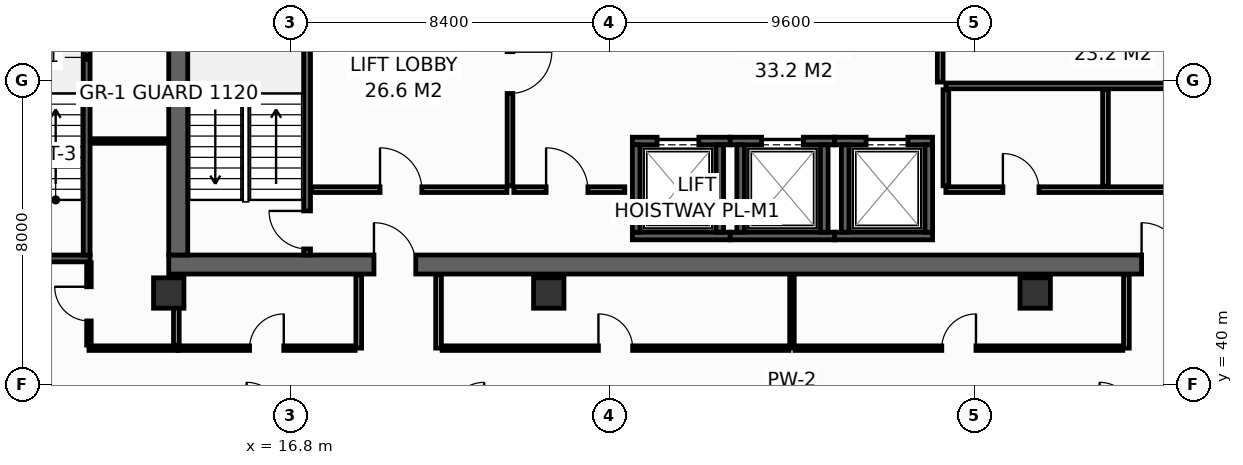
"""IFC4 building model, lengths in metres.
Left out: names, types, materials, properties, quantities, classifications, styles, units other than length and angle.
Written with IfcOpenShell. Run it as: python <this file> out.ifc"""

import sys

from ifc_helpers import new_model, si_unit, direction, frame, frame_2d, origin, origin_2d, place, context, subcontext, project, spatial, rectangle, hollow_rectangle, extrude, element, fill, save


model = new_model("IFC4")
c1 = context("Model", 3, precision=1e-05, world=origin(), true_north=direction((0.0, 1.0)))
c2 = subcontext(c1, "Body", "Model", "MODEL_VIEW")
j1 = project(units=[si_unit("LENGTHUNIT", "METRE"), si_unit("PLANEANGLEUNIT", "RADIAN")], contexts=[c1])
p1 = place(None, origin())
s1 = spatial("IfcSite", under=j1, at=p1, CompositionType="ELEMENT")
p2 = place(p1, origin())
s2 = spatial("IfcBuilding", under=s1, at=p2, CompositionType="ELEMENT")
p3 = place(p2, frame((0.0, 0.0, 186.6)))
s3 = spatial("IfcBuildingStorey", under=s2, at=p3, CompositionType="ELEMENT", Elevation=186.6)
p4 = place(p3, frame((13.6, 43.15, 0.0), z_axis=(0.0, 0.0, 1.0), x_axis=(1.0, 0.0, 0.0)))
e1 = element("IfcWall", 1, at=p4, inside=s3, PredefinedType="SHEAR", context=c2, shape_type="SweptSolid", body=[
    extrude(rectangle(XDim=32.7, YDim=0.5, at=frame_2d((16.35, 0.0))), origin(), (0.0, 0.0, 1.0), 3.55),
])
p5 = place(p4, frame((5.4, 0.0, 0.0)))
e2 = element("IfcOpeningElement", 2, at=p5, cuts=e1, PredefinedType="OPENING", context=c2, shape_type="SweptSolid", body=[
    extrude(rectangle(XDim=1.1, YDim=2.15, at=frame_2d((0.55, 1.075))), frame((0.0, 0.26, 0.0), z_axis=(0.0, -1.0, 0.0), x_axis=(1.0, 0.0, 0.0)), (0.0, 0.0, 1.0), 0.52),
])
p6 = place(p4, frame((25.6, 0.0, 0.0)))
e3 = element("IfcOpeningElement", 3, at=p6, cuts=e1, PredefinedType="OPENING", context=c2, shape_type="SweptSolid", body=[
    extrude(rectangle(XDim=1.1, YDim=2.15, at=frame_2d((0.55, 1.075))), frame((0.0, 0.26, 0.0), z_axis=(0.0, -1.0, 0.0), x_axis=(1.0, 0.0, 0.0)), (0.0, 0.0, 1.0), 0.52),
])
p7 = place(p3, frame((13.85, 43.4, 0.0), z_axis=(0.0, 0.0, 1.0), x_axis=(0.0, 1.0, 0.0)))
e4 = element("IfcWall", 4, at=p7, inside=s3, PredefinedType="SHEAR", context=c2, shape_type="SweptSolid", body=[
    extrude(rectangle(XDim=10.4, YDim=0.5, at=frame_2d((5.2, 0.0))), origin(), (0.0, 0.0, 1.0), 3.55),
])
for number, where, z_axis, x_axis in (
    (5, (13.6, 42.4, 0.0), (0.0, 0.0, 1.0), (1.0, 0.0, 0.0)),
    (6, (23.6, 42.4, 0.0), (0.0, 0.0, 1.0), (1.0, 0.0, 0.0)),
    (7, (36.4, 42.4, 0.0), (0.0, 0.0, 1.0), (1.0, 0.0, 0.0)),
):
    element("IfcColumn", number, at=place(p3, frame(where, z_axis=z_axis, x_axis=x_axis)), inside=s3, PredefinedType="COLUMN", context=c2, shape_type="SweptSolid", body=[
        extrude(hollow_rectangle(XDim=0.8, YDim=0.8, WallThickness=0.036, at=origin_2d()), origin(), (0.0, 0.0, 1.0), 3.8),
    ])
p8 = place(p3, frame((25.8, 43.9, 0.0), z_axis=(0.0, 0.0, 1.0), x_axis=(1.0, 0.0, 0.0)))
e8 = element("IfcWall", 8, at=p8, inside=s3, PredefinedType="SHEAR", context=c2, shape_type="SweptSolid", body=[
    extrude(rectangle(XDim=2.575, YDim=0.2, at=frame_2d((1.288, 0.0))), origin(), (0.0, 0.0, 1.0), 3.55),
])
p9 = place(p3, frame((25.8, 46.4, 0.0), z_axis=(0.0, 0.0, 1.0), x_axis=(1.0, 0.0, 0.0)))
e9 = element("IfcWall", 9, at=p9, inside=s3, PredefinedType="SHEAR", context=c2, shape_type="SweptSolid", body=[
    extrude(rectangle(XDim=2.575, YDim=0.2, at=frame_2d((1.288, 0.0))), origin(), (0.0, 0.0, 1.0), 3.55),
])
p10 = place(p9, frame((0.65, 0.0, 0.0)))
e10 = element("IfcOpeningElement", 10, at=p10, cuts=e9, PredefinedType="OPENING", context=c2, shape_type="SweptSolid", body=[
    extrude(rectangle(XDim=1.1, YDim=2.2, at=frame_2d((0.55, 1.1))), frame((0.0, 0.11, 0.0), z_axis=(0.0, -1.0, 0.0), x_axis=(1.0, 0.0, 0.0)), (0.0, 0.0, 1.0), 0.22),
])
for number, where, z_axis, x_axis in (
    (11, (25.9, 44.0, 0.0), (0.0, 0.0, 1.0), (0.0, 1.0, 0.0)),
    (12, (28.1, 44.0, 0.0), (0.0, 0.0, 1.0), (0.0, 1.0, 0.0)),
):
    element("IfcWall", number, at=place(p3, frame(where, z_axis=z_axis, x_axis=x_axis)), inside=s3, PredefinedType="SHEAR", context=c2, shape_type="SweptSolid", body=[
        extrude(rectangle(XDim=2.3, YDim=0.2, at=frame_2d((1.15, 0.0))), origin(), (0.0, 0.0, 1.0), 3.55),
    ])
p11 = place(p3, frame((28.375, 43.9, 0.0), z_axis=(0.0, 0.0, 1.0), x_axis=(1.0, 0.0, 0.0)))
e13 = element("IfcWall", 13, at=p11, inside=s3, PredefinedType="SHEAR", context=c2, shape_type="SweptSolid", body=[
    extrude(rectangle(XDim=2.75, YDim=0.2, at=frame_2d((1.375, 0.0))), origin(), (0.0, 0.0, 1.0), 3.55),
])
p12 = place(p3, frame((28.375, 46.4, 0.0), z_axis=(0.0, 0.0, 1.0), x_axis=(1.0, 0.0, 0.0)))
e14 = element("IfcWall", 14, at=p12, inside=s3, PredefinedType="SHEAR", context=c2, shape_type="SweptSolid", body=[
    extrude(rectangle(XDim=2.75, YDim=0.2, at=frame_2d((1.375, 0.0))), origin(), (0.0, 0.0, 1.0), 3.55),
])
p13 = place(p12, frame((0.825, 0.0, 0.0)))
e15 = element("IfcOpeningElement", 15, at=p13, cuts=e14, PredefinedType="OPENING", context=c2, shape_type="SweptSolid", body=[
    extrude(rectangle(XDim=1.1, YDim=2.2, at=frame_2d((0.55, 1.1))), frame((0.0, 0.11, 0.0), z_axis=(0.0, -1.0, 0.0), x_axis=(1.0, 0.0, 0.0)), (0.0, 0.0, 1.0), 0.22),
])
for number, where, z_axis, x_axis in (
    (16, (28.65, 44.0, 0.0), (0.0, 0.0, 1.0), (0.0, 1.0, 0.0)),
    (17, (30.85, 44.0, 0.0), (0.0, 0.0, 1.0), (0.0, 1.0, 0.0)),
):
    element("IfcWall", number, at=place(p3, frame(where, z_axis=z_axis, x_axis=x_axis)), inside=s3, PredefinedType="SHEAR", context=c2, shape_type="SweptSolid", body=[
        extrude(rectangle(XDim=2.3, YDim=0.2, at=frame_2d((1.15, 0.0))), origin(), (0.0, 0.0, 1.0), 3.55),
    ])
p14 = place(p3, frame((31.125, 43.9, 0.0), z_axis=(0.0, 0.0, 1.0), x_axis=(1.0, 0.0, 0.0)))
e18 = element("IfcWall", 18, at=p14, inside=s3, PredefinedType="SHEAR", context=c2, shape_type="SweptSolid", body=[
    extrude(rectangle(XDim=2.575, YDim=0.2, at=frame_2d((1.288, 0.0))), origin(), (0.0, 0.0, 1.0), 3.55),
])
p15 = place(p3, frame((31.125, 46.4, 0.0), z_axis=(0.0, 0.0, 1.0), x_axis=(1.0, 0.0, 0.0)))
e19 = element("IfcWall", 19, at=p15, inside=s3, PredefinedType="SHEAR", context=c2, shape_type="SweptSolid", body=[
    extrude(rectangle(XDim=2.575, YDim=0.2, at=frame_2d((1.288, 0.0))), origin(), (0.0, 0.0, 1.0), 3.55),
])
p16 = place(p15, frame((0.825, 0.0, 0.0)))
e20 = element("IfcOpeningElement", 20, at=p16, cuts=e19, PredefinedType="OPENING", context=c2, shape_type="SweptSolid", body=[
    extrude(rectangle(XDim=1.1, YDim=2.2, at=frame_2d((0.55, 1.1))), frame((0.0, 0.11, 0.0), z_axis=(0.0, -1.0, 0.0), x_axis=(1.0, 0.0, 0.0)), (0.0, 0.0, 1.0), 0.22),
])
for number, where, z_axis, x_axis in (
    (21, (31.4, 44.0, 0.0), (0.0, 0.0, 1.0), (0.0, 1.0, 0.0)),
    (22, (33.6, 44.0, 0.0), (0.0, 0.0, 1.0), (0.0, 1.0, 0.0)),
):
    element("IfcWall", number, at=place(p3, frame(where, z_axis=z_axis, x_axis=x_axis)), inside=s3, PredefinedType="SHEAR", context=c2, shape_type="SweptSolid", body=[
        extrude(rectangle(XDim=2.3, YDim=0.2, at=frame_2d((1.15, 0.0))), origin(), (0.0, 0.0, 1.0), 3.55),
    ])
p17 = place(p3, frame((17.24, 43.4, 0.0), z_axis=(0.0, 0.0, 1.0), x_axis=(0.0, 1.0, 0.0)))
e23 = element("IfcWall", 23, at=p17, inside=s3, PredefinedType="SHEAR", context=c2, shape_type="SweptSolid", body=[
    extrude(rectangle(XDim=10.4, YDim=0.18, at=frame_2d((5.2, 0.0))), origin(), (0.0, 0.0, 1.0), 3.55),
])
p18 = place(p17, frame((0.16, 0.0, 0.0)))
e24 = element("IfcOpeningElement", 24, at=p18, cuts=e23, PredefinedType="OPENING", context=c2, shape_type="SweptSolid", body=[
    extrude(rectangle(XDim=1.0, YDim=2.15, at=frame_2d((0.5, 1.075))), frame((0.0, 0.1, 0.0), z_axis=(0.0, -1.0, 0.0), x_axis=(1.0, 0.0, 0.0)), (0.0, 0.0, 1.0), 0.2),
])
p19 = place(p3, frame((8.12, 43.31, 0.0), z_axis=(0.0, 0.0, 1.0), x_axis=(1.0, 0.0, 0.0)))
e25 = element("IfcWall", 25, at=p19, inside=s3, PredefinedType="SHEAR", context=c2, shape_type="SweptSolid", body=[
    extrude(rectangle(XDim=3.41, YDim=0.18, at=frame_2d((1.705, 0.0))), origin(), (0.0, 0.0, 1.0), 3.55),
])
p20 = place(p19, frame((1.15, 0.0, 0.0)))
e26 = element("IfcOpeningElement", 26, at=p20, cuts=e25, PredefinedType="OPENING", context=c2, shape_type="SweptSolid", body=[
    extrude(rectangle(XDim=1.1, YDim=2.15, at=frame_2d((0.55, 1.075))), frame((0.0, 0.1, 0.0), z_axis=(0.0, -1.0, 0.0), x_axis=(1.0, 0.0, 0.0)), (0.0, 0.0, 1.0), 0.2),
])
p21 = place(p3, frame((11.44, 43.4, 0.0), z_axis=(0.0, 0.0, 1.0), x_axis=(0.0, 1.0, 0.0)))
e27 = element("IfcWall", 27, at=p21, inside=s3, PredefinedType="SHEAR", context=c2, shape_type="SweptSolid", body=[
    extrude(rectangle(XDim=10.4, YDim=0.18, at=frame_2d((5.2, 0.0))), origin(), (0.0, 0.0, 1.0), 3.55),
])
p22 = place(p3, frame((17.36, 45.12, 0.0), z_axis=(0.0, 0.0, 1.0), x_axis=(1.0, 0.0, 0.0)))
e28 = element("IfcWall", 28, at=p22, inside=s3, PredefinedType="PARTITIONING", context=c2, shape_type="SweptSolid", body=[
    extrude(rectangle(XDim=5.14, YDim=0.15, at=frame_2d((2.57, 0.0))), origin(), (0.0, 0.0, 1.0), 3.55),
])
p23 = place(p22, frame((1.8, 0.0, 0.0)))
e29 = element("IfcOpeningElement", 29, at=p23, cuts=e28, PredefinedType="OPENING", context=c2, shape_type="SweptSolid", body=[
    extrude(rectangle(XDim=1.1, YDim=2.15, at=frame_2d((0.55, 1.075))), frame((0.0, 0.085, 0.0), z_axis=(0.0, -1.0, 0.0), x_axis=(1.0, 0.0, 0.0)), (0.0, 0.0, 1.0), 0.17),
])
p24 = place(p3, frame((22.58, 50.55, 0.0), z_axis=(0.0, 0.0, 1.0), x_axis=(0.0, -1.0, 0.0)))
e30 = element("IfcWall", 30, at=p24, inside=s3, PredefinedType="PARTITIONING", context=c2, shape_type="SweptSolid", body=[
    extrude(rectangle(XDim=5.33, YDim=0.15, at=frame_2d((2.665, 0.0))), origin(), (0.0, 0.0, 1.0), 3.55),
])
p25 = place(p24, frame((1.8, 0.0, 0.0)))
e31 = element("IfcOpeningElement", 31, at=p25, cuts=e30, PredefinedType="OPENING", context=c2, shape_type="SweptSolid", body=[
    extrude(rectangle(XDim=1.1, YDim=2.15, at=frame_2d((0.55, 1.075))), frame((0.0, 0.085, 0.0), z_axis=(0.0, -1.0, 0.0), x_axis=(1.0, 0.0, 0.0)), (0.0, 0.0, 1.0), 0.17),
])
p26 = place(p3, frame((22.68, 45.12, 0.0), z_axis=(0.0, 0.0, 1.0), x_axis=(1.0, 0.0, 0.0)))
e32 = element("IfcWall", 32, at=p26, inside=s3, PredefinedType="PARTITIONING", context=c2, shape_type="SweptSolid", body=[
    extrude(rectangle(XDim=2.92, YDim=0.15, at=frame_2d((1.46, 0.0))), origin(), (0.0, 0.0, 1.0), 3.55),
])
p27 = place(p26, frame((0.85, 0.0, 0.0)))
e33 = element("IfcOpeningElement", 33, at=p27, cuts=e32, PredefinedType="OPENING", context=c2, shape_type="SweptSolid", body=[
    extrude(rectangle(XDim=1.1, YDim=2.15, at=frame_2d((0.55, 1.075))), frame((0.0, 0.085, 0.0), z_axis=(0.0, -1.0, 0.0), x_axis=(1.0, 0.0, 0.0)), (0.0, 0.0, 1.0), 0.17),
])
p28 = place(p3, frame((33.9, 47.95, 0.0), z_axis=(0.0, 0.0, 1.0), x_axis=(0.0, 1.0, 0.0)))
e34 = element("IfcWall", 34, at=p28, inside=s3, PredefinedType="PARTITIONING", context=c2, shape_type="SweptSolid", body=[
    extrude(rectangle(XDim=2.75, YDim=0.15, at=frame_2d((1.375, 0.0))), origin(), (0.0, 0.0, 1.0), 3.55),
])
p29 = place(p28, frame((0.85, 0.0, 0.0)))
e35 = element("IfcOpeningElement", 35, at=p29, cuts=e34, PredefinedType="OPENING", context=c2, shape_type="SweptSolid", body=[
    extrude(rectangle(XDim=1.05, YDim=2.15, at=frame_2d((0.525, 1.075))), frame((0.0, 0.085, 0.0), z_axis=(0.0, -1.0, 0.0), x_axis=(1.0, 0.0, 0.0)), (0.0, 0.0, 1.0), 0.17),
])
p30 = place(p3, frame((34.05, 45.12, 0.0), z_axis=(0.0, 0.0, 1.0), x_axis=(1.0, 0.0, 0.0)))
e36 = element("IfcWall", 36, at=p30, inside=s3, PredefinedType="PARTITIONING", context=c2, shape_type="SweptSolid", body=[
    extrude(rectangle(XDim=8.45, YDim=0.15, at=frame_2d((4.225, 0.0))), origin(), (0.0, 0.0, 1.0), 3.55),
])
p31 = place(p30, frame((1.5, 0.0, 0.0)))
e37 = element("IfcOpeningElement", 37, at=p31, cuts=e36, PredefinedType="OPENING", context=c2, shape_type="SweptSolid", body=[
    extrude(rectangle(XDim=0.95, YDim=2.15, at=frame_2d((0.475, 1.075))), frame((0.0, 0.085, 0.0), z_axis=(0.0, -1.0, 0.0), x_axis=(1.0, 0.0, 0.0)), (0.0, 0.0, 1.0), 0.17),
])
p32 = place(p30, frame((5.8, 0.0, 0.0)))
e38 = element("IfcOpeningElement", 38, at=p32, cuts=e36, PredefinedType="OPENING", context=c2, shape_type="SweptSolid", body=[
    extrude(rectangle(XDim=0.95, YDim=2.15, at=frame_2d((0.475, 1.075))), frame((0.0, 0.085, 0.0), z_axis=(0.0, -1.0, 0.0), x_axis=(1.0, 0.0, 0.0)), (0.0, 0.0, 1.0), 0.17),
])
p33 = place(p3, frame((34.05, 47.85, 0.0), z_axis=(0.0, 0.0, 1.0), x_axis=(1.0, 0.0, 0.0)))
e39 = element("IfcWall", 39, at=p33, inside=s3, PredefinedType="PARTITIONING", context=c2, shape_type="SweptSolid", body=[
    extrude(rectangle(XDim=8.45, YDim=0.15, at=frame_2d((4.225, 0.0))), origin(), (0.0, 0.0, 1.0), 3.55),
])
for number, where, z_axis, x_axis in (
    (40, (38.25, 45.22, 0.0), (0.0, 0.0, 1.0), (0.0, 1.0, 0.0)),
    (41, (34.05, 45.22, 0.0), (0.0, 0.0, 1.0), (0.0, 1.0, 0.0)),
):
    element("IfcWall", number, at=place(p3, frame(where, z_axis=z_axis, x_axis=x_axis)), inside=s3, PredefinedType="PARTITIONING", context=c2, shape_type="SweptSolid", body=[
        extrude(rectangle(XDim=2.53, YDim=0.15, at=frame_2d((1.265, 0.0))), origin(), (0.0, 0.0, 1.0), 3.55),
    ])
p34 = place(p3, frame((11.5, 40.95, 0.0), z_axis=(0.0, 0.0, 1.0), x_axis=(1.0, 0.0, 0.0)))
e42 = element("IfcWall", 42, at=p34, inside=s3, PredefinedType="PARTITIONING", context=c2, shape_type="SweptSolid", body=[
    extrude(rectangle(XDim=2.35, YDim=0.12, at=frame_2d((1.175, 0.0))), origin(), (0.0, 0.0, 1.0), 3.55),
])
p35 = place(p3, frame((11.55, 46.4, 0.0), z_axis=(0.0, 0.0, 1.0), x_axis=(1.0, 0.0, 0.0)))
e43 = element("IfcWall", 43, at=p35, inside=s3, PredefinedType="PARTITIONING", context=c2, shape_type="SweptSolid", body=[
    extrude(rectangle(XDim=2.03, YDim=0.12, at=frame_2d((1.015, 0.0))), origin(), (0.0, 0.0, 1.0), 3.55),
])
p36 = place(p3, frame((11.5, 41.03, 0.0), z_axis=(0.0, 0.0, 1.0), x_axis=(0.0, 1.0, 0.0)))
e44 = element("IfcWall", 44, at=p36, inside=s3, PredefinedType="PARTITIONING", context=c2, shape_type="SweptSolid", body=[
    extrude(rectangle(XDim=2.17, YDim=0.12, at=frame_2d((1.085, 0.0))), origin(), (0.0, 0.0, 1.0), 2.835),
])
p37 = place(p36, frame((0.635, 0.0, 0.0)))
e45 = element("IfcOpeningElement", 45, at=p37, cuts=e44, PredefinedType="OPENING", context=c2, shape_type="SweptSolid", body=[
    extrude(rectangle(XDim=0.9, YDim=2.1, at=frame_2d((0.45, 1.05))), frame((0.0, 0.07, 0.0), z_axis=(0.0, -1.0, 0.0), x_axis=(1.0, 0.0, 0.0)), (0.0, 0.0, 1.0), 0.14),
])
p38 = place(p3, frame((13.8, 41.03, 0.0), z_axis=(0.0, 0.0, 1.0), x_axis=(0.0, 1.0, 0.0)))
e46 = element("IfcWall", 46, at=p38, inside=s3, PredefinedType="PARTITIONING", context=c2, shape_type="SweptSolid", body=[
    extrude(rectangle(XDim=1.85, YDim=0.15, at=frame_2d((0.925, 0.0))), origin(), (0.0, 0.0, 1.0), 3.55),
])
for number, where, z_axis, x_axis in (
    (47, (18.6, 40.95, 0.0), (0.0, 0.0, 1.0), (0.0, 1.0, 0.0)),
    (48, (20.7, 40.95, 0.0), (0.0, 0.0, 1.0), (0.0, 1.0, 0.0)),
    (49, (38.8, 40.95, 0.0), (0.0, 0.0, 1.0), (0.0, 1.0, 0.0)),
):
    element("IfcWall", number, at=place(p3, frame(where, z_axis=z_axis, x_axis=x_axis)), inside=s3, PredefinedType="PARTITIONING", context=c2, shape_type="SweptSolid", body=[
        extrude(rectangle(XDim=1.93, YDim=0.15, at=frame_2d((0.965, 0.0))), origin(), (0.0, 0.0, 1.0), 3.55),
    ])
p39 = place(p3, frame((13.85, 40.95, 0.0), z_axis=(0.0, 0.0, 1.0), x_axis=(1.0, 0.0, 0.0)))
e50 = element("IfcWall", 50, at=p39, inside=s3, PredefinedType="PARTITIONING", context=c2, shape_type="SweptSolid", body=[
    extrude(rectangle(XDim=4.655, YDim=0.12, at=frame_2d((2.327, 0.0))), origin(), (0.0, 0.0, 1.0), 3.55),
])
p40 = place(p39, frame((1.877, 0.0, 0.0)))
e51 = element("IfcOpeningElement", 51, at=p40, cuts=e50, PredefinedType="OPENING", context=c2, shape_type="SweptSolid", body=[
    extrude(rectangle(XDim=0.9, YDim=2.1, at=frame_2d((0.45, 1.05))), frame((0.0, 0.07, 0.0), z_axis=(0.0, -1.0, 0.0), x_axis=(1.0, 0.0, 0.0)), (0.0, 0.0, 1.0), 0.14),
])
p41 = place(p3, frame((30.0, 40.95, 0.0), z_axis=(0.0, 0.0, 1.0), x_axis=(0.0, 1.0, 0.0)))
e52 = element("IfcWall", 52, at=p41, inside=s3, PredefinedType="PARTITIONING", context=c2, shape_type="SweptSolid", body=[
    extrude(rectangle(XDim=1.93, YDim=0.12, at=frame_2d((0.965, 0.0))), origin(), (0.0, 0.0, 1.0), 2.835),
])
p42 = place(p3, frame((20.795, 40.95, 0.0), z_axis=(0.0, 0.0, 1.0), x_axis=(1.0, 0.0, 0.0)))
e53 = element("IfcWall", 53, at=p42, inside=s3, PredefinedType="PARTITIONING", context=c2, shape_type="SweptSolid", body=[
    extrude(rectangle(XDim=9.125, YDim=0.12, at=frame_2d((4.562, 0.0))), origin(), (0.0, 0.0, 1.0), 2.835),
])
p43 = place(p42, frame((4.112, 0.0, 0.0)))
e54 = element("IfcOpeningElement", 54, at=p43, cuts=e53, PredefinedType="OPENING", context=c2, shape_type="SweptSolid", body=[
    extrude(rectangle(XDim=0.9, YDim=2.1, at=frame_2d((0.45, 1.05))), frame((0.0, 0.07, 0.0), z_axis=(0.0, -1.0, 0.0), x_axis=(1.0, 0.0, 0.0)), (0.0, 0.0, 1.0), 0.14),
])
p44 = place(p3, frame((30.08, 40.95, 0.0), z_axis=(0.0, 0.0, 1.0), x_axis=(1.0, 0.0, 0.0)))
e55 = element("IfcWall", 55, at=p44, inside=s3, PredefinedType="PARTITIONING", context=c2, shape_type="SweptSolid", body=[
    extrude(rectangle(XDim=8.625, YDim=0.12, at=frame_2d((4.312, 0.0))), origin(), (0.0, 0.0, 1.0), 2.835),
])
p45 = place(p44, frame((3.862, 0.0, 0.0)))
e56 = element("IfcOpeningElement", 56, at=p45, cuts=e55, PredefinedType="OPENING", context=c2, shape_type="SweptSolid", body=[
    extrude(rectangle(XDim=0.9, YDim=2.1, at=frame_2d((0.45, 1.05))), frame((0.0, 0.07, 0.0), z_axis=(0.0, -1.0, 0.0), x_axis=(1.0, 0.0, 0.0)), (0.0, 0.0, 1.0), 0.14),
])
p46 = place(p10, origin())
e57 = element("IfcDoor", 57, at=p46, inside=s3, OperationType="SLIDING_TO_LEFT", PredefinedType="DOOR", context=c2, shape_type="SweptSolid", body=[
    extrude(rectangle(XDim=1.1, YDim=2.2, at=frame_2d((0.55, 1.1))), frame((0.0, 0.025, 0.0), z_axis=(0.0, -1.0, 0.0), x_axis=(1.0, 0.0, 0.0)), (0.0, 0.0, 1.0), 0.05),
])
fill(e10, e57)
p47 = place(p13, origin())
e58 = element("IfcDoor", 58, at=p47, inside=s3, OperationType="SLIDING_TO_LEFT", PredefinedType="DOOR", context=c2, shape_type="SweptSolid", body=[
    extrude(rectangle(XDim=1.1, YDim=2.2, at=frame_2d((0.55, 1.1))), frame((0.0, 0.025, 0.0), z_axis=(0.0, -1.0, 0.0), x_axis=(1.0, 0.0, 0.0)), (0.0, 0.0, 1.0), 0.05),
])
fill(e15, e58)
p48 = place(p16, origin())
e59 = element("IfcDoor", 59, at=p48, inside=s3, OperationType="SLIDING_TO_LEFT", PredefinedType="DOOR", context=c2, shape_type="SweptSolid", body=[
    extrude(rectangle(XDim=1.1, YDim=2.2, at=frame_2d((0.55, 1.1))), frame((0.0, 0.025, 0.0), z_axis=(0.0, -1.0, 0.0), x_axis=(1.0, 0.0, 0.0)), (0.0, 0.0, 1.0), 0.05),
])
fill(e20, e59)
p49 = place(p18, origin())
e60 = element("IfcDoor", 60, at=p49, inside=s3, OperationType="SINGLE_SWING_RIGHT", PredefinedType="DOOR", context=c2, shape_type="SweptSolid", body=[
    extrude(rectangle(XDim=1.0, YDim=2.15, at=frame_2d((0.5, 1.075))), frame((0.0, 0.025, 0.0), z_axis=(0.0, -1.0, 0.0), x_axis=(1.0, 0.0, 0.0)), (0.0, 0.0, 1.0), 0.05),
])
fill(e24, e60)
p50 = place(p23, origin())
e61 = element("IfcDoor", 61, at=p50, inside=s3, OperationType="SINGLE_SWING_LEFT", PredefinedType="DOOR", context=c2, shape_type="SweptSolid", body=[
    extrude(rectangle(XDim=1.1, YDim=2.15, at=frame_2d((0.55, 1.075))), frame((0.0, 0.025, 0.0), z_axis=(0.0, -1.0, 0.0), x_axis=(1.0, 0.0, 0.0)), (0.0, 0.0, 1.0), 0.05),
])
fill(e29, e61)
p51 = place(p25, origin())
e62 = element("IfcDoor", 62, at=p51, inside=s3, OperationType="SINGLE_SWING_LEFT", PredefinedType="DOOR", context=c2, shape_type="SweptSolid", body=[
    extrude(rectangle(XDim=1.1, YDim=2.15, at=frame_2d((0.55, 1.075))), frame((0.0, 0.025, 0.0), z_axis=(0.0, -1.0, 0.0), x_axis=(1.0, 0.0, 0.0)), (0.0, 0.0, 1.0), 0.05),
])
fill(e31, e62)
p52 = place(p27, origin())
e63 = element("IfcDoor", 63, at=p52, inside=s3, OperationType="SINGLE_SWING_LEFT", PredefinedType="DOOR", context=c2, shape_type="SweptSolid", body=[
    extrude(rectangle(XDim=1.1, YDim=2.15, at=frame_2d((0.55, 1.075))), frame((0.0, 0.025, 0.0), z_axis=(0.0, -1.0, 0.0), x_axis=(1.0, 0.0, 0.0)), (0.0, 0.0, 1.0), 0.05),
])
fill(e33, e63)
p53 = place(p5, origin())
e64 = element("IfcDoor", 64, at=p53, inside=s3, OperationType="SINGLE_SWING_LEFT", PredefinedType="DOOR", context=c2, shape_type="SweptSolid", body=[
    extrude(rectangle(XDim=1.1, YDim=2.15, at=frame_2d((0.55, 1.075))), frame((0.0, 0.025, 0.0), z_axis=(0.0, -1.0, 0.0), x_axis=(1.0, 0.0, 0.0)), (0.0, 0.0, 1.0), 0.05),
])
fill(e2, e64)
p54 = place(p6, origin())
e65 = element("IfcDoor", 65, at=p54, inside=s3, OperationType="SINGLE_SWING_LEFT", PredefinedType="DOOR", context=c2, shape_type="SweptSolid", body=[
    extrude(rectangle(XDim=1.1, YDim=2.15, at=frame_2d((0.55, 1.075))), frame((0.0, 0.025, 0.0), z_axis=(0.0, -1.0, 0.0), x_axis=(1.0, 0.0, 0.0)), (0.0, 0.0, 1.0), 0.05),
])
fill(e3, e65)
p55 = place(p31, origin())
e66 = element("IfcDoor", 66, at=p55, inside=s3, OperationType="SINGLE_SWING_LEFT", PredefinedType="DOOR", context=c2, shape_type="SweptSolid", body=[
    extrude(rectangle(XDim=0.95, YDim=2.15, at=frame_2d((0.475, 1.075))), frame((0.0, 0.025, 0.0), z_axis=(0.0, -1.0, 0.0), x_axis=(1.0, 0.0, 0.0)), (0.0, 0.0, 1.0), 0.05),
])
fill(e37, e66)
p56 = place(p37, origin())
e67 = element("IfcDoor", 67, at=p56, inside=s3, OperationType="SINGLE_SWING_RIGHT", PredefinedType="DOOR", context=c2, shape_type="SweptSolid", body=[
    extrude(rectangle(XDim=0.9, YDim=2.1, at=frame_2d((0.45, 1.05))), frame((0.0, 0.025, 0.0), z_axis=(0.0, -1.0, 0.0), x_axis=(1.0, 0.0, 0.0)), (0.0, 0.0, 1.0), 0.05),
])
fill(e45, e67)
p57 = place(p40, origin())
e68 = element("IfcDoor", 68, at=p57, inside=s3, OperationType="SINGLE_SWING_RIGHT", PredefinedType="DOOR", context=c2, shape_type="SweptSolid", body=[
    extrude(rectangle(XDim=0.9, YDim=2.1, at=frame_2d((0.45, 1.05))), frame((0.0, 0.025, 0.0), z_axis=(0.0, -1.0, 0.0), x_axis=(1.0, 0.0, 0.0)), (0.0, 0.0, 1.0), 0.05),
])
fill(e51, e68)
p58 = place(p43, origin())
e69 = element("IfcDoor", 69, at=p58, inside=s3, OperationType="SINGLE_SWING_LEFT", PredefinedType="DOOR", context=c2, shape_type="SweptSolid", body=[
    extrude(rectangle(XDim=0.9, YDim=2.1, at=frame_2d((0.45, 1.05))), frame((0.0, 0.025, 0.0), z_axis=(0.0, -1.0, 0.0), x_axis=(1.0, 0.0, 0.0)), (0.0, 0.0, 1.0), 0.05),
])
fill(e54, e69)
p59 = place(p45, origin())
e70 = element("IfcDoor", 70, at=p59, inside=s3, OperationType="SINGLE_SWING_RIGHT", PredefinedType="DOOR", context=c2, shape_type="SweptSolid", body=[
    extrude(rectangle(XDim=0.9, YDim=2.1, at=frame_2d((0.45, 1.05))), frame((0.0, 0.025, 0.0), z_axis=(0.0, -1.0, 0.0), x_axis=(1.0, 0.0, 0.0)), (0.0, 0.0, 1.0), 0.05),
])
fill(e56, e70)
save(model, sys.argv[1])
